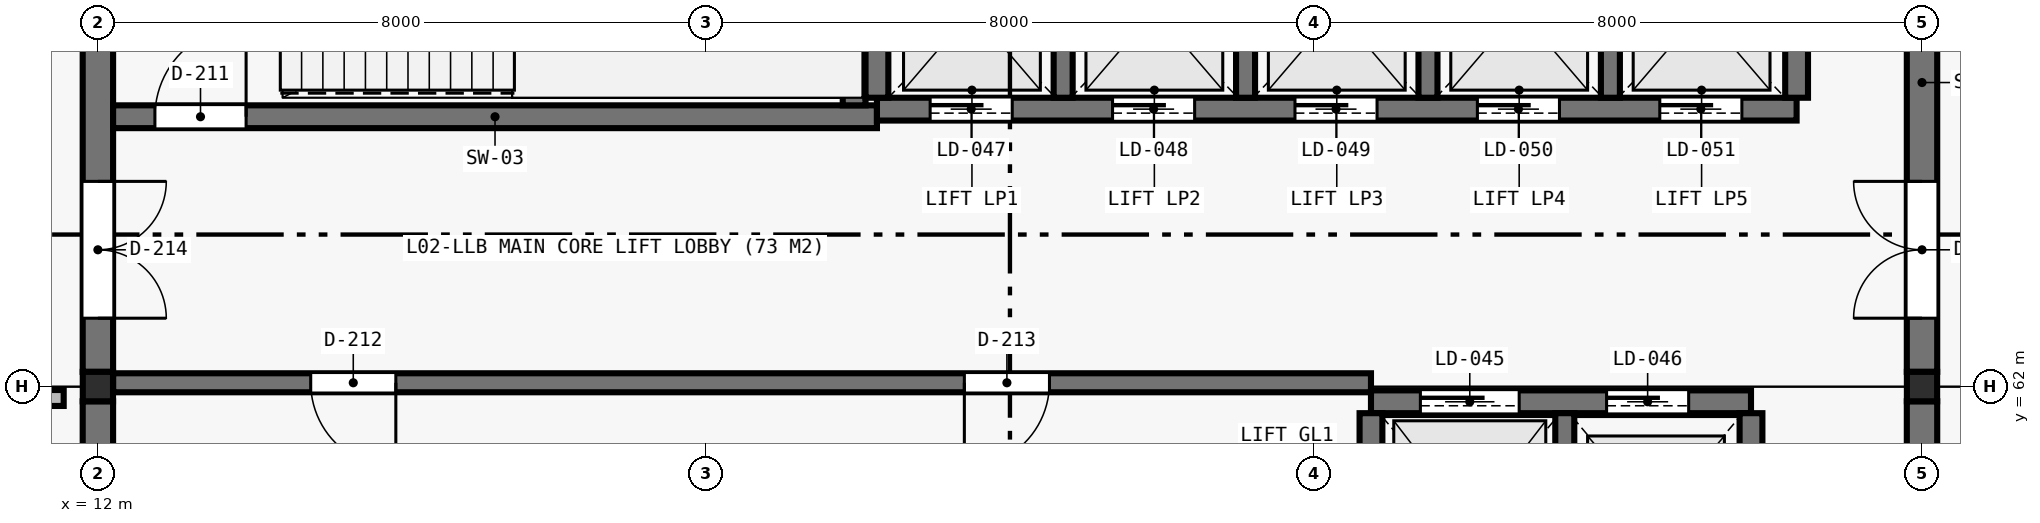
"""IFC4 building model, lengths in metres.
Left out: names, types, materials, properties, quantities, classifications, styles, units other than length and angle.
Written with IfcOpenShell. Run it as: python <this file> out.ifc"""

import sys

from ifc_helpers import new_model, si_unit, direction, frame, frame_2d, origin, origin_2d, place, context, subcontext, project, spatial, rectangle, i_section, extrude, element, fill, save


model = new_model("IFC4")
c1 = context("Model", 3, precision=1e-05, world=origin(), true_north=direction((0.0, 1.0)))
c2 = subcontext(c1, "Body", "Model", "MODEL_VIEW")
j1 = project(units=[si_unit("LENGTHUNIT", "METRE"), si_unit("PLANEANGLEUNIT", "RADIAN")], contexts=[c1])
p1 = place(None, origin())
s1 = spatial("IfcSite", under=j1, at=p1, CompositionType="ELEMENT")
p2 = place(p1, origin())
s2 = spatial("IfcBuilding", under=s1, at=p2, CompositionType="ELEMENT")
p3 = place(p2, frame((0.0, 0.0, 11.2)))
s3 = spatial("IfcBuildingStorey", under=s2, at=p3, CompositionType="ELEMENT", Elevation=11.2)
for number, where, z_axis, x_axis in (
    (1, (12.0, 62.0, 0.0), (0.0, 0.0, 1.0), (1.0, 0.0, 0.0)),
    (2, (36.0, 62.0, 0.0), (0.0, 0.0, 1.0), (1.0, 0.0, 0.0)),
):
    element("IfcColumn", number, at=place(p3, frame(where, z_axis=z_axis, x_axis=x_axis)), inside=s3, PredefinedType="COLUMN", context=c2, shape_type="SweptSolid", body=[
        extrude(i_section(OverallWidth=0.398, OverallDepth=0.387, WebThickness=0.021, FlangeThickness=0.033, at=origin_2d()), origin(), (0.0, 0.0, 1.0), 4.0),
    ])
p4 = place(p3, frame((12.0, 54.194, 0.0), z_axis=(0.0, 0.0, 1.0), x_axis=(0.0, 1.0, 0.0)))
e3 = element("IfcWall", 3, at=p4, inside=s3, PredefinedType="SHEAR", context=c2, shape_type="SweptSolid", body=[
    extrude(rectangle(XDim=7.613, YDim=0.4, at=frame_2d((3.806, 0.0))), origin(), (0.0, 0.0, 1.0), 4.0),
])
p5 = place(p3, frame((12.0, 62.194, 0.0), z_axis=(0.0, 0.0, 1.0), x_axis=(0.0, 1.0, 0.0)))
e4 = element("IfcWall", 4, at=p5, inside=s3, PredefinedType="SHEAR", context=c2, shape_type="SweptSolid", body=[
    extrude(rectangle(XDim=7.613, YDim=0.4, at=frame_2d((3.806, 0.0))), origin(), (0.0, 0.0, 1.0), 4.0),
])
p6 = place(p5, frame((0.706, 0.0, 0.0)))
e5 = element("IfcOpeningElement", 5, at=p6, cuts=e4, PredefinedType="OPENING", context=c2, shape_type="SweptSolid", body=[
    extrude(rectangle(XDim=1.8, YDim=2.2, at=frame_2d((0.9, 1.1))), frame((0.0, 0.21, 0.0), z_axis=(0.0, -1.0, 0.0), x_axis=(1.0, 0.0, 0.0)), (0.0, 0.0, 1.0), 0.42),
])
p7 = place(p3, frame((36.0, 54.194, 0.0), z_axis=(0.0, 0.0, 1.0), x_axis=(0.0, 1.0, 0.0)))
e6 = element("IfcWall", 6, at=p7, inside=s3, PredefinedType="SHEAR", context=c2, shape_type="SweptSolid", body=[
    extrude(rectangle(XDim=7.613, YDim=0.4, at=frame_2d((3.806, 0.0))), origin(), (0.0, 0.0, 1.0), 4.0),
])
p8 = place(p3, frame((36.0, 62.194, 0.0), z_axis=(0.0, 0.0, 1.0), x_axis=(0.0, 1.0, 0.0)))
e7 = element("IfcWall", 7, at=p8, inside=s3, PredefinedType="SHEAR", context=c2, shape_type="SweptSolid", body=[
    extrude(rectangle(XDim=7.613, YDim=0.4, at=frame_2d((3.806, 0.0))), origin(), (0.0, 0.0, 1.0), 4.0),
])
p9 = place(p8, frame((0.706, 0.0, 0.0)))
e8 = element("IfcOpeningElement", 8, at=p9, cuts=e7, PredefinedType="OPENING", context=c2, shape_type="SweptSolid", body=[
    extrude(rectangle(XDim=1.8, YDim=2.2, at=frame_2d((0.9, 1.1))), frame((0.0, 0.21, 0.0), z_axis=(0.0, -1.0, 0.0), x_axis=(1.0, 0.0, 0.0)), (0.0, 0.0, 1.0), 0.42),
])
p10 = place(p3, frame((28.75, 61.8, 0.0), z_axis=(0.0, 0.0, 1.0), x_axis=(1.0, 0.0, 0.0)))
e9 = element("IfcWall", 9, at=p10, inside=s3, PredefinedType="SHEAR", context=c2, shape_type="SweptSolid", body=[
    extrude(rectangle(XDim=5.0, YDim=0.3, at=frame_2d((2.5, 0.0))), origin(), (0.0, 0.0, 1.0), 4.0),
])
p11 = place(p10, frame((0.65, 0.0, 0.0)))
e10 = element("IfcOpeningElement", 10, at=p11, cuts=e9, PredefinedType="OPENING", context=c2, shape_type="SweptSolid", body=[
    extrude(rectangle(XDim=1.3, YDim=2.3, at=frame_2d((0.65, 1.15))), frame((0.0, 0.16, 0.0), z_axis=(0.0, -1.0, 0.0), x_axis=(1.0, 0.0, 0.0)), (0.0, 0.0, 1.0), 0.32),
])
p12 = place(p10, frame((3.1, 0.0, 0.0)))
e11 = element("IfcOpeningElement", 11, at=p12, cuts=e9, PredefinedType="OPENING", context=c2, shape_type="SweptSolid", body=[
    extrude(rectangle(XDim=1.08, YDim=2.2, at=frame_2d((0.54, 1.1))), frame((0.0, 0.16, 0.0), z_axis=(0.0, -1.0, 0.0), x_axis=(1.0, 0.0, 0.0)), (0.0, 0.0, 1.0), 0.32),
])
for number, where, z_axis, x_axis in (
    (12, (28.75, 58.8, 0.0), (0.0, 0.0, 1.0), (0.0, 1.0, 0.0)),
    (13, (33.75, 58.8, 0.0), (0.0, 0.0, 1.0), (0.0, 1.0, 0.0)),
):
    element("IfcWall", number, at=place(p3, frame(where, z_axis=z_axis, x_axis=x_axis)), inside=s3, PredefinedType="SHEAR", context=c2, shape_type="SweptSolid", body=[
        extrude(rectangle(XDim=2.85, YDim=0.3, at=frame_2d((1.425, 0.0))), origin(), (0.0, 0.0, 1.0), 4.0),
    ])
p13 = place(p3, frame((31.3, 58.8, 0.0), z_axis=(0.0, 0.0, 1.0), x_axis=(0.0, 1.0, 0.0)))
e14 = element("IfcWall", 14, at=p13, inside=s3, PredefinedType="SHEAR", context=c2, shape_type="SweptSolid", body=[
    extrude(rectangle(XDim=2.85, YDim=0.25, at=frame_2d((1.425, 0.0))), origin(), (0.0, 0.0, 1.0), 4.0),
])
p14 = place(p3, frame((12.2, 62.05, 0.0), z_axis=(0.0, 0.0, 1.0), x_axis=(1.0, 0.0, 0.0)))
e15 = element("IfcWall", 15, at=p14, inside=s3, PredefinedType="SHEAR", context=c2, shape_type="SweptSolid", body=[
    extrude(rectangle(XDim=16.55, YDim=0.25, at=frame_2d((8.275, 0.0))), origin(), (0.0, 0.0, 1.0), 4.0),
])
p15 = place(p14, frame((2.6, 0.0, 0.0)))
e16 = element("IfcOpeningElement", 16, at=p15, cuts=e15, PredefinedType="OPENING", context=c2, shape_type="SweptSolid", body=[
    extrude(rectangle(XDim=1.12, YDim=2.22, at=frame_2d((0.56, 1.11))), frame((0.0, 0.135, 0.0), z_axis=(0.0, -1.0, 0.0), x_axis=(1.0, 0.0, 0.0)), (0.0, 0.0, 1.0), 0.27),
])
p16 = place(p14, frame((11.2, 0.0, 0.0)))
e17 = element("IfcOpeningElement", 17, at=p16, cuts=e15, PredefinedType="OPENING", context=c2, shape_type="SweptSolid", body=[
    extrude(rectangle(XDim=1.12, YDim=2.22, at=frame_2d((0.56, 1.11))), frame((0.0, 0.135, 0.0), z_axis=(0.0, -1.0, 0.0), x_axis=(1.0, 0.0, 0.0)), (0.0, 0.0, 1.0), 0.27),
])
p17 = place(p3, frame((12.2, 65.55, 0.0), z_axis=(0.0, 0.0, 1.0), x_axis=(1.0, 0.0, 0.0)))
e18 = element("IfcWall", 18, at=p17, inside=s3, PredefinedType="SHEAR", context=c2, shape_type="SweptSolid", body=[
    extrude(rectangle(XDim=10.05, YDim=0.3, at=frame_2d((5.025, 0.0))), origin(), (0.0, 0.0, 1.0), 4.0),
])
p18 = place(p17, frame((0.55, 0.0, 0.0)))
e19 = element("IfcOpeningElement", 19, at=p18, cuts=e18, PredefinedType="OPENING", context=c2, shape_type="SweptSolid", body=[
    extrude(rectangle(XDim=1.2, YDim=2.2, at=frame_2d((0.6, 1.1))), frame((0.0, 0.16, 0.0), z_axis=(0.0, -1.0, 0.0), x_axis=(1.0, 0.0, 0.0)), (0.0, 0.0, 1.0), 0.32),
])
p19 = place(p3, frame((21.95, 65.7, 0.0), z_axis=(0.0, 0.0, 1.0), x_axis=(0.0, 1.0, 0.0)))
e20 = element("IfcWall", 20, at=p19, inside=s3, PredefinedType="SHEAR", context=c2, shape_type="SweptSolid", body=[
    extrude(rectangle(XDim=4.05, YDim=0.3, at=frame_2d((2.025, 0.0))), origin(), (0.0, 0.0, 1.0), 4.0),
])
p20 = place(p3, frame((22.25, 65.65, 0.0), z_axis=(0.0, 0.0, 1.0), x_axis=(1.0, 0.0, 0.0)))
e21 = element("IfcWall", 21, at=p20, inside=s3, PredefinedType="SHEAR", context=c2, shape_type="SweptSolid", body=[
    extrude(rectangle(XDim=12.1, YDim=0.3, at=frame_2d((6.05, 0.0))), origin(), (0.0, 0.0, 1.0), 4.0),
])
p21 = place(p20, frame((0.7, 0.0, 0.0)))
e22 = element("IfcOpeningElement", 22, at=p21, cuts=e21, PredefinedType="OPENING", context=c2, shape_type="SweptSolid", body=[
    extrude(rectangle(XDim=1.08, YDim=2.2, at=frame_2d((0.54, 1.1))), frame((0.0, 0.16, 0.0), z_axis=(0.0, -1.0, 0.0), x_axis=(1.0, 0.0, 0.0)), (0.0, 0.0, 1.0), 0.32),
])
p22 = place(p20, frame((3.1, 0.0, 0.0)))
e23 = element("IfcOpeningElement", 23, at=p22, cuts=e21, PredefinedType="OPENING", context=c2, shape_type="SweptSolid", body=[
    extrude(rectangle(XDim=1.08, YDim=2.2, at=frame_2d((0.54, 1.1))), frame((0.0, 0.16, 0.0), z_axis=(0.0, -1.0, 0.0), x_axis=(1.0, 0.0, 0.0)), (0.0, 0.0, 1.0), 0.32),
])
p23 = place(p20, frame((5.5, 0.0, 0.0)))
e24 = element("IfcOpeningElement", 24, at=p23, cuts=e21, PredefinedType="OPENING", context=c2, shape_type="SweptSolid", body=[
    extrude(rectangle(XDim=1.08, YDim=2.2, at=frame_2d((0.54, 1.1))), frame((0.0, 0.16, 0.0), z_axis=(0.0, -1.0, 0.0), x_axis=(1.0, 0.0, 0.0)), (0.0, 0.0, 1.0), 0.32),
])
p24 = place(p20, frame((7.9, 0.0, 0.0)))
e25 = element("IfcOpeningElement", 25, at=p24, cuts=e21, PredefinedType="OPENING", context=c2, shape_type="SweptSolid", body=[
    extrude(rectangle(XDim=1.08, YDim=2.2, at=frame_2d((0.54, 1.1))), frame((0.0, 0.16, 0.0), z_axis=(0.0, -1.0, 0.0), x_axis=(1.0, 0.0, 0.0)), (0.0, 0.0, 1.0), 0.32),
])
p25 = place(p20, frame((10.3, 0.0, 0.0)))
e26 = element("IfcOpeningElement", 26, at=p25, cuts=e21, PredefinedType="OPENING", context=c2, shape_type="SweptSolid", body=[
    extrude(rectangle(XDim=1.08, YDim=2.2, at=frame_2d((0.54, 1.1))), frame((0.0, 0.16, 0.0), z_axis=(0.0, -1.0, 0.0), x_axis=(1.0, 0.0, 0.0)), (0.0, 0.0, 1.0), 0.32),
])
for number, where, z_axis, x_axis in (
    (27, (22.25, 65.8, 0.0), (0.0, 0.0, 1.0), (0.0, 1.0, 0.0)),
    (28, (34.35, 65.8, 0.0), (0.0, 0.0, 1.0), (0.0, 1.0, 0.0)),
):
    element("IfcWall", number, at=place(p3, frame(where, z_axis=z_axis, x_axis=x_axis)), inside=s3, PredefinedType="SHEAR", context=c2, shape_type="SweptSolid", body=[
        extrude(rectangle(XDim=2.3, YDim=0.3, at=frame_2d((1.15, 0.0))), origin(), (0.0, 0.0, 1.0), 4.0),
    ])
for number, where, z_axis, x_axis in (
    (29, (24.7, 65.8, 0.0), (0.0, 0.0, 1.0), (0.0, 1.0, 0.0)),
    (30, (27.1, 65.8, 0.0), (0.0, 0.0, 1.0), (0.0, 1.0, 0.0)),
    (31, (29.5, 65.8, 0.0), (0.0, 0.0, 1.0), (0.0, 1.0, 0.0)),
    (32, (31.9, 65.8, 0.0), (0.0, 0.0, 1.0), (0.0, 1.0, 0.0)),
):
    element("IfcWall", number, at=place(p3, frame(where, z_axis=z_axis, x_axis=x_axis)), inside=s3, PredefinedType="SHEAR", context=c2, shape_type="SweptSolid", body=[
        extrude(rectangle(XDim=2.3, YDim=0.25, at=frame_2d((1.15, 0.0))), origin(), (0.0, 0.0, 1.0), 4.0),
    ])
p26 = place(p3, frame((6.35, 61.85, 0.0), z_axis=(0.0, 0.0, 1.0), x_axis=(1.0, 0.0, 0.0)))
e33 = element("IfcWall", 33, at=p26, inside=s3, PredefinedType="PLUMBINGWALL", context=c2, shape_type="SweptSolid", body=[
    extrude(rectangle(XDim=5.2, YDim=0.21, at=frame_2d((2.6, 0.0))), origin(), (0.0, 0.0, 1.0), 3.25),
])
p27 = place(p26, frame((0.35, 0.0, 0.0)))
e34 = element("IfcOpeningElement", 34, at=p27, cuts=e33, PredefinedType="OPENING", context=c2, shape_type="SweptSolid", body=[
    extrude(rectangle(XDim=0.95, YDim=2.1, at=frame_2d((0.475, 1.05))), frame((0.0, 0.115, 0.0), z_axis=(0.0, -1.0, 0.0), x_axis=(1.0, 0.0, 0.0)), (0.0, 0.0, 1.0), 0.23),
])
p28 = place(p26, frame((2.1, 0.0, 0.0)))
e35 = element("IfcOpeningElement", 35, at=p28, cuts=e33, PredefinedType="OPENING", context=c2, shape_type="SweptSolid", body=[
    extrude(rectangle(XDim=0.9, YDim=2.1, at=frame_2d((0.45, 1.05))), frame((0.0, 0.115, 0.0), z_axis=(0.0, -1.0, 0.0), x_axis=(1.0, 0.0, 0.0)), (0.0, 0.0, 1.0), 0.23),
])
p29 = place(p26, frame((3.8, 0.0, 0.0)))
e36 = element("IfcOpeningElement", 36, at=p29, cuts=e33, PredefinedType="OPENING", context=c2, shape_type="SweptSolid", body=[
    extrude(rectangle(XDim=0.9, YDim=2.1, at=frame_2d((0.45, 1.05))), frame((0.0, 0.115, 0.0), z_axis=(0.0, -1.0, 0.0), x_axis=(1.0, 0.0, 0.0)), (0.0, 0.0, 1.0), 0.23),
])
p30 = place(p18, origin())
e37 = element("IfcDoor", 37, at=p30, inside=s3, OperationType="SINGLE_SWING_RIGHT", PredefinedType="DOOR", context=c2, shape_type="SweptSolid", body=[
    extrude(rectangle(XDim=1.2, YDim=2.2, at=frame_2d((0.6, 1.1))), frame((0.0, 0.025, 0.0), z_axis=(0.0, -1.0, 0.0), x_axis=(1.0, 0.0, 0.0)), (0.0, 0.0, 1.0), 0.05),
])
fill(e19, e37)
p31 = place(p11, origin())
e38 = element("IfcDoor", 38, at=p31, inside=s3, OperationType="SLIDING_TO_LEFT", PredefinedType="DOOR", context=c2, shape_type="SweptSolid", body=[
    extrude(rectangle(XDim=1.3, YDim=2.3, at=frame_2d((0.65, 1.15))), frame((0.0, 0.025, 0.0), z_axis=(0.0, -1.0, 0.0), x_axis=(1.0, 0.0, 0.0)), (0.0, 0.0, 1.0), 0.05),
])
fill(e10, e38)
p32 = place(p12, origin())
e39 = element("IfcDoor", 39, at=p32, inside=s3, OperationType="SLIDING_TO_LEFT", PredefinedType="DOOR", context=c2, shape_type="SweptSolid", body=[
    extrude(rectangle(XDim=1.08, YDim=2.2, at=frame_2d((0.54, 1.1))), frame((0.0, 0.025, 0.0), z_axis=(0.0, -1.0, 0.0), x_axis=(1.0, 0.0, 0.0)), (0.0, 0.0, 1.0), 0.05),
])
fill(e11, e39)
p33 = place(p21, origin())
e40 = element("IfcDoor", 40, at=p33, inside=s3, OperationType="SLIDING_TO_LEFT", PredefinedType="DOOR", context=c2, shape_type="SweptSolid", body=[
    extrude(rectangle(XDim=1.08, YDim=2.2, at=frame_2d((0.54, 1.1))), frame((0.0, 0.025, 0.0), z_axis=(0.0, -1.0, 0.0), x_axis=(1.0, 0.0, 0.0)), (0.0, 0.0, 1.0), 0.05),
])
fill(e22, e40)
p34 = place(p22, origin())
e41 = element("IfcDoor", 41, at=p34, inside=s3, OperationType="SLIDING_TO_LEFT", PredefinedType="DOOR", context=c2, shape_type="SweptSolid", body=[
    extrude(rectangle(XDim=1.08, YDim=2.2, at=frame_2d((0.54, 1.1))), frame((0.0, 0.025, 0.0), z_axis=(0.0, -1.0, 0.0), x_axis=(1.0, 0.0, 0.0)), (0.0, 0.0, 1.0), 0.05),
])
fill(e23, e41)
p35 = place(p23, origin())
e42 = element("IfcDoor", 42, at=p35, inside=s3, OperationType="SLIDING_TO_LEFT", PredefinedType="DOOR", context=c2, shape_type="SweptSolid", body=[
    extrude(rectangle(XDim=1.08, YDim=2.2, at=frame_2d((0.54, 1.1))), frame((0.0, 0.025, 0.0), z_axis=(0.0, -1.0, 0.0), x_axis=(1.0, 0.0, 0.0)), (0.0, 0.0, 1.0), 0.05),
])
fill(e24, e42)
p36 = place(p24, origin())
e43 = element("IfcDoor", 43, at=p36, inside=s3, OperationType="SLIDING_TO_LEFT", PredefinedType="DOOR", context=c2, shape_type="SweptSolid", body=[
    extrude(rectangle(XDim=1.08, YDim=2.2, at=frame_2d((0.54, 1.1))), frame((0.0, 0.025, 0.0), z_axis=(0.0, -1.0, 0.0), x_axis=(1.0, 0.0, 0.0)), (0.0, 0.0, 1.0), 0.05),
])
fill(e25, e43)
p37 = place(p25, origin())
e44 = element("IfcDoor", 44, at=p37, inside=s3, OperationType="SLIDING_TO_LEFT", PredefinedType="DOOR", context=c2, shape_type="SweptSolid", body=[
    extrude(rectangle(XDim=1.08, YDim=2.2, at=frame_2d((0.54, 1.1))), frame((0.0, 0.025, 0.0), z_axis=(0.0, -1.0, 0.0), x_axis=(1.0, 0.0, 0.0)), (0.0, 0.0, 1.0), 0.05),
])
fill(e26, e44)
p38 = place(p15, frame((1.12, 0.0, 0.0), z_axis=(0.0, 0.0, 1.0), x_axis=(-1.0, 0.0, 0.0)))
e45 = element("IfcDoor", 45, at=p38, inside=s3, OperationType="SINGLE_SWING_LEFT", PredefinedType="DOOR", context=c2, shape_type="SweptSolid", body=[
    extrude(rectangle(XDim=1.12, YDim=2.22, at=frame_2d((0.56, 1.11))), frame((0.0, 0.025, 0.0), z_axis=(0.0, -1.0, 0.0), x_axis=(1.0, 0.0, 0.0)), (0.0, 0.0, 1.0), 0.05),
])
fill(e16, e45)
p39 = place(p16, frame((1.12, 0.0, 0.0), z_axis=(0.0, 0.0, 1.0), x_axis=(-1.0, 0.0, 0.0)))
e46 = element("IfcDoor", 46, at=p39, inside=s3, OperationType="SINGLE_SWING_RIGHT", PredefinedType="DOOR", context=c2, shape_type="SweptSolid", body=[
    extrude(rectangle(XDim=1.12, YDim=2.22, at=frame_2d((0.56, 1.11))), frame((0.0, 0.025, 0.0), z_axis=(0.0, -1.0, 0.0), x_axis=(1.0, 0.0, 0.0)), (0.0, 0.0, 1.0), 0.05),
])
fill(e17, e46)
p40 = place(p6, frame((1.8, 0.0, 0.0), z_axis=(0.0, 0.0, 1.0), x_axis=(-1.0, 0.0, 0.0)))
e47 = element("IfcDoor", 47, at=p40, inside=s3, OperationType="DOUBLE_DOOR_SINGLE_SWING", PredefinedType="DOOR", context=c2, shape_type="SweptSolid", body=[
    extrude(rectangle(XDim=1.8, YDim=2.2, at=frame_2d((0.9, 1.1))), frame((0.0, 0.025, 0.0), z_axis=(0.0, -1.0, 0.0), x_axis=(1.0, 0.0, 0.0)), (0.0, 0.0, 1.0), 0.05),
])
fill(e5, e47)
p41 = place(p9, origin())
e48 = element("IfcDoor", 48, at=p41, inside=s3, OperationType="DOUBLE_DOOR_SINGLE_SWING", PredefinedType="DOOR", context=c2, shape_type="SweptSolid", body=[
    extrude(rectangle(XDim=1.8, YDim=2.2, at=frame_2d((0.9, 1.1))), frame((0.0, 0.025, 0.0), z_axis=(0.0, -1.0, 0.0), x_axis=(1.0, 0.0, 0.0)), (0.0, 0.0, 1.0), 0.05),
])
fill(e8, e48)
save(model, sys.argv[1])
